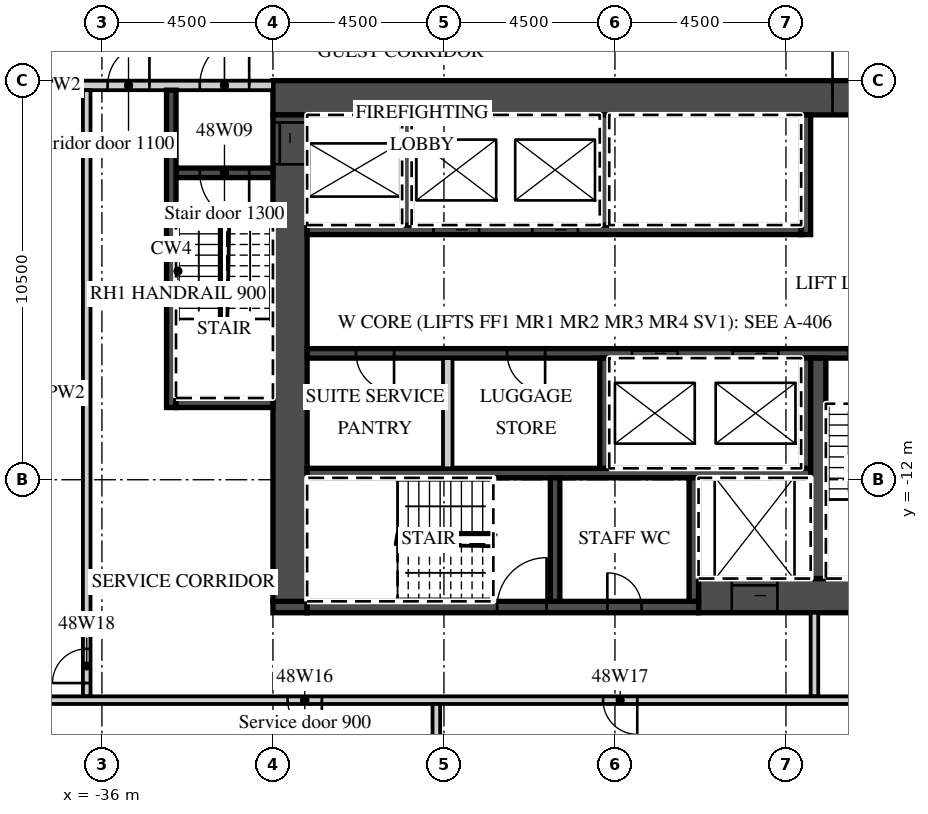
"""IFC4 building model, lengths in metres.
Left out: names, types, materials, properties, quantities, classifications, styles, units other than length and angle.
Written with IfcOpenShell. Run it as: python <this file> out.ifc"""

import sys

from ifc_helpers import new_model, si_unit, direction, frame, frame_2d, origin, place, context, subcontext, project, spatial, rectangle, extrude, element, fill, save


model = new_model("IFC4")
c1 = context("Model", 3, precision=1e-05, world=origin(), true_north=direction((0.0, 1.0)))
c2 = subcontext(c1, "Body", "Model", "MODEL_VIEW")
j1 = project(units=[si_unit("LENGTHUNIT", "METRE"), si_unit("PLANEANGLEUNIT", "RADIAN")], contexts=[c1])
p1 = place(None, origin())
s1 = spatial("IfcSite", under=j1, at=p1, CompositionType="ELEMENT")
p2 = place(p1, origin())
s2 = spatial("IfcBuilding", under=s1, at=p2, CompositionType="ELEMENT")
p3 = place(p2, frame((0.0, 0.0, 199.9)))
s3 = spatial("IfcBuildingStorey", under=s2, at=p3, CompositionType="ELEMENT", Elevation=199.9)
p4 = place(p3, frame((-31.5, -1.95, 0.0), z_axis=(0.0, 0.0, 1.0), x_axis=(1.0, 0.0, 0.0)))
e1 = element("IfcWall", 1, at=p4, inside=s3, PredefinedType="SHEAR", context=c2, shape_type="SweptSolid", body=[
    extrude(rectangle(XDim=18.0, YDim=0.9, at=frame_2d((9.0, 0.0))), origin(), (0.0, 0.0, 1.0), 3.02),
])
p5 = place(p4, frame((14.725, 0.0, 0.0)))
e2 = element("IfcOpeningElement", 2, at=p5, cuts=e1, PredefinedType="OPENING", context=c2, shape_type="SweptSolid", body=[
    extrude(rectangle(XDim=1.8, YDim=2.1, at=frame_2d((0.9, 1.05))), frame((0.0, 0.46, 0.0), z_axis=(0.0, -1.0, 0.0), x_axis=(1.0, 0.0, 0.0)), (0.0, 0.0, 1.0), 0.92),
])
p6 = place(p3, frame((-20.3, -15.05, 0.0), z_axis=(0.0, 0.0, 1.0), x_axis=(1.0, 0.0, 0.0)))
e3 = element("IfcWall", 3, at=p6, inside=s3, PredefinedType="SHEAR", context=c2, shape_type="SweptSolid", body=[
    extrude(rectangle(XDim=6.8, YDim=0.9, at=frame_2d((3.4, 0.0))), origin(), (0.0, 0.0, 1.0), 3.02),
])
p7 = place(p6, frame((0.875, 0.0, 0.0)))
e4 = element("IfcOpeningElement", 4, at=p7, cuts=e3, PredefinedType="OPENING", context=c2, shape_type="SweptSolid", body=[
    extrude(rectangle(XDim=1.2, YDim=2.1, at=frame_2d((0.6, 1.05))), frame((0.0, 0.46, 0.0), z_axis=(0.0, -1.0, 0.0), x_axis=(1.0, 0.0, 0.0)), (0.0, 0.0, 1.0), 0.92),
])
p8 = place(p3, frame((-31.5, -15.35, 0.0), z_axis=(0.0, 0.0, 1.0), x_axis=(1.0, 0.0, 0.0)))
e5 = element("IfcWall", 5, at=p8, inside=s3, PredefinedType="SHEAR", context=c2, shape_type="SweptSolid", body=[
    extrude(rectangle(XDim=0.9, YDim=0.3, at=frame_2d((0.45, 0.0))), origin(), (0.0, 0.0, 1.0), 3.02),
])
p9 = place(p3, frame((-30.6, -15.35, 0.0), z_axis=(0.0, 0.0, 1.0), x_axis=(1.0, 0.0, 0.0)))
e6 = element("IfcWall", 6, at=p9, inside=s3, PredefinedType="SHEAR", context=c2, shape_type="SweptSolid", body=[
    extrude(rectangle(XDim=10.3, YDim=0.3, at=frame_2d((5.15, 0.0))), origin(), (0.0, 0.0, 1.0), 3.02),
])
p10 = place(p9, frame((5.0, 0.0, 0.0)))
e7 = element("IfcOpeningElement", 7, at=p10, cuts=e6, PredefinedType="OPENING", context=c2, shape_type="SweptSolid", body=[
    extrude(rectangle(XDim=1.3, YDim=2.1, at=frame_2d((0.65, 1.05))), frame((0.0, 0.16, 0.0), z_axis=(0.0, -1.0, 0.0), x_axis=(1.0, 0.0, 0.0)), (0.0, 0.0, 1.0), 0.32),
])
p11 = place(p9, frame((7.9, 0.0, 0.0)))
e8 = element("IfcOpeningElement", 8, at=p11, cuts=e6, PredefinedType="OPENING", context=c2, shape_type="SweptSolid", body=[
    extrude(rectangle(XDim=0.9, YDim=2.1, at=frame_2d((0.45, 1.05))), frame((0.0, 0.16, 0.0), z_axis=(0.0, -1.0, 0.0), x_axis=(1.0, 0.0, 0.0)), (0.0, 0.0, 1.0), 0.32),
])
p12 = place(p3, frame((-31.05, -15.2, 0.0), z_axis=(0.0, 0.0, 1.0), x_axis=(0.0, 1.0, 0.0)))
e9 = element("IfcWall", 9, at=p12, inside=s3, PredefinedType="SHEAR", context=c2, shape_type="SweptSolid", body=[
    extrude(rectangle(XDim=12.8, YDim=0.9, at=frame_2d((6.4, 0.0))), origin(), (0.0, 0.0, 1.0), 3.02),
])
p13 = place(p12, frame((11.5, 0.0, 0.0)))
e10 = element("IfcOpeningElement", 10, at=p13, cuts=e9, PredefinedType="OPENING", context=c2, shape_type="SweptSolid", body=[
    extrude(rectangle(XDim=1.1, YDim=2.1, at=frame_2d((0.55, 1.05))), frame((0.0, 0.46, 0.0), z_axis=(0.0, -1.0, 0.0), x_axis=(1.0, 0.0, 0.0)), (0.0, 0.0, 1.0), 0.92),
])
p14 = place(p3, frame((-30.6, -5.425, 0.0), z_axis=(0.0, 0.0, 1.0), x_axis=(1.0, 0.0, 0.0)))
e11 = element("IfcWall", 11, at=p14, inside=s3, PredefinedType="SHEAR", context=c2, shape_type="SweptSolid", body=[
    extrude(rectangle(XDim=13.0, YDim=0.25, at=frame_2d((6.5, 0.0))), origin(), (0.0, 0.0, 1.0), 3.02),
])
p15 = place(p14, frame((3.325, 0.0, 0.0)))
e12 = element("IfcOpeningElement", 12, at=p15, cuts=e11, PredefinedType="OPENING", context=c2, shape_type="SweptSolid", body=[
    extrude(rectangle(XDim=1.2, YDim=2.1, at=frame_2d((0.6, 1.05))), frame((0.0, 0.135, 0.0), z_axis=(0.0, -1.0, 0.0), x_axis=(1.0, 0.0, 0.0)), (0.0, 0.0, 1.0), 0.27),
])
p16 = place(p14, frame((5.925, 0.0, 0.0)))
e13 = element("IfcOpeningElement", 13, at=p16, cuts=e11, PredefinedType="OPENING", context=c2, shape_type="SweptSolid", body=[
    extrude(rectangle(XDim=1.2, YDim=2.1, at=frame_2d((0.6, 1.05))), frame((0.0, 0.135, 0.0), z_axis=(0.0, -1.0, 0.0), x_axis=(1.0, 0.0, 0.0)), (0.0, 0.0, 1.0), 0.27),
])
p17 = place(p3, frame((-17.475, -5.55, 0.0), z_axis=(0.0, 0.0, 1.0), x_axis=(0.0, 1.0, 0.0)))
e14 = element("IfcWall", 14, at=p17, inside=s3, PredefinedType="SHEAR", context=c2, shape_type="SweptSolid", body=[
    extrude(rectangle(XDim=3.15, YDim=0.25, at=frame_2d((1.575, 0.0))), origin(), (0.0, 0.0, 1.0), 3.02),
])
for number, where, z_axis, x_axis in (
    (15, (-27.975, -5.3, 0.0), (0.0, 0.0, 1.0), (0.0, 1.0, 0.0)),
    (16, (-22.775, -5.3, 0.0), (0.0, 0.0, 1.0), (0.0, 1.0, 0.0)),
):
    element("IfcWall", number, at=place(p3, frame(where, z_axis=z_axis, x_axis=x_axis)), inside=s3, PredefinedType="SHEAR", context=c2, shape_type="SweptSolid", body=[
        extrude(rectangle(XDim=2.9, YDim=0.25, at=frame_2d((1.45, 0.0))), origin(), (0.0, 0.0, 1.0), 3.02),
    ])
p18 = place(p3, frame((-30.6, -8.675, 0.0), z_axis=(0.0, 0.0, 1.0), x_axis=(1.0, 0.0, 0.0)))
e17 = element("IfcWall", 17, at=p18, inside=s3, PredefinedType="SHEAR", context=c2, shape_type="SweptSolid", body=[
    extrude(rectangle(XDim=16.2, YDim=0.25, at=frame_2d((8.1, 0.0))), origin(), (0.0, 0.0, 1.0), 3.02),
])
p19 = place(p18, frame((8.55, 0.0, 0.0)))
e18 = element("IfcOpeningElement", 18, at=p19, cuts=e17, PredefinedType="OPENING", context=c2, shape_type="SweptSolid", body=[
    extrude(rectangle(XDim=1.2, YDim=2.1, at=frame_2d((0.6, 1.05))), frame((0.0, 0.135, 0.0), z_axis=(0.0, -1.0, 0.0), x_axis=(1.0, 0.0, 0.0)), (0.0, 0.0, 1.0), 0.27),
])
p20 = place(p18, frame((11.2, 0.0, 0.0)))
e19 = element("IfcOpeningElement", 19, at=p20, cuts=e17, PredefinedType="OPENING", context=c2, shape_type="SweptSolid", body=[
    extrude(rectangle(XDim=1.2, YDim=2.1, at=frame_2d((0.6, 1.05))), frame((0.0, 0.135, 0.0), z_axis=(0.0, -1.0, 0.0), x_axis=(1.0, 0.0, 0.0)), (0.0, 0.0, 1.0), 0.27),
])
p21 = place(p18, frame((14.25, 0.0, 0.0)))
e20 = element("IfcOpeningElement", 20, at=p21, cuts=e17, PredefinedType="OPENING", context=c2, shape_type="SweptSolid", body=[
    extrude(rectangle(XDim=1.3, YDim=2.1, at=frame_2d((0.65, 1.05))), frame((0.0, 0.135, 0.0), z_axis=(0.0, -1.0, 0.0), x_axis=(1.0, 0.0, 0.0)), (0.0, 0.0, 1.0), 0.27),
])
p22 = place(p18, frame((1.288, 0.0, 0.0)))
e21 = element("IfcOpeningElement", 21, at=p22, cuts=e17, PredefinedType="OPENING", context=c2, shape_type="SweptSolid", body=[
    extrude(rectangle(XDim=1.0, YDim=2.1, at=frame_2d((0.5, 1.05))), frame((0.0, 0.135, 0.0), z_axis=(0.0, -1.0, 0.0), x_axis=(1.0, 0.0, 0.0)), (0.0, 0.0, 1.0), 0.27),
])
p23 = place(p18, frame((5.262, 0.0, 0.0)))
e22 = element("IfcOpeningElement", 22, at=p23, cuts=e17, PredefinedType="OPENING", context=c2, shape_type="SweptSolid", body=[
    extrude(rectangle(XDim=1.0, YDim=2.1, at=frame_2d((0.5, 1.05))), frame((0.0, 0.135, 0.0), z_axis=(0.0, -1.0, 0.0), x_axis=(1.0, 0.0, 0.0)), (0.0, 0.0, 1.0), 0.27),
])
p24 = place(p3, frame((-30.6, -11.825, 0.0), z_axis=(0.0, 0.0, 1.0), x_axis=(1.0, 0.0, 0.0)))
e23 = element("IfcWall", 23, at=p24, inside=s3, PredefinedType="SHEAR", context=c2, shape_type="SweptSolid", body=[
    extrude(rectangle(XDim=13.25, YDim=0.25, at=frame_2d((6.625, 0.0))), origin(), (0.0, 0.0, 1.0), 3.02),
])
for number, where, z_axis, x_axis in (
    (24, (-17.475, -11.7, 0.0), (0.0, 0.0, 1.0), (0.0, 1.0, 0.0)),
    (25, (-22.775, -11.7, 0.0), (0.0, 0.0, 1.0), (0.0, 1.0, 0.0)),
):
    element("IfcWall", number, at=place(p3, frame(where, z_axis=z_axis, x_axis=x_axis)), inside=s3, PredefinedType="SHEAR", context=c2, shape_type="SweptSolid", body=[
        extrude(rectangle(XDim=2.9, YDim=0.25, at=frame_2d((1.45, 0.0))), origin(), (0.0, 0.0, 1.0), 3.02),
    ])
p25 = place(p3, frame((-26.9, -11.7, 0.0), z_axis=(0.0, 0.0, 1.0), x_axis=(0.0, 1.0, 0.0)))
e26 = element("IfcWall", 26, at=p25, inside=s3, PredefinedType="PARTITIONING", context=c2, shape_type="SweptSolid", body=[
    extrude(rectangle(XDim=2.9, YDim=0.25, at=frame_2d((1.45, 0.0))), origin(), (0.0, 0.0, 1.0), 3.02),
])
p26 = place(p3, frame((-17.15, -14.6, 0.0), z_axis=(0.0, 0.0, 1.0), x_axis=(0.0, 1.0, 0.0)))
e27 = element("IfcWall", 27, at=p26, inside=s3, PredefinedType="SHEAR", context=c2, shape_type="SweptSolid", body=[
    extrude(rectangle(XDim=5.8, YDim=0.4, at=frame_2d((2.9, 0.0))), origin(), (0.0, 0.0, 1.0), 3.02),
])
for number, where, z_axis, x_axis in (
    (28, (-20.425, -15.2, 0.0), (0.0, 0.0, 1.0), (0.0, 1.0, 0.0)),
    (29, (-24.075, -15.2, 0.0), (0.0, 0.0, 1.0), (0.0, 1.0, 0.0)),
):
    element("IfcWall", number, at=place(p3, frame(where, z_axis=z_axis, x_axis=x_axis)), inside=s3, PredefinedType="SHEAR", context=c2, shape_type="SweptSolid", body=[
        extrude(rectangle(XDim=3.25, YDim=0.25, at=frame_2d((1.625, 0.0))), origin(), (0.0, 0.0, 1.0), 3.02),
    ])
p27 = place(p3, frame((-42.632, -1.625, 0.0), z_axis=(0.0, 0.0, 1.0), x_axis=(1.0, 0.0, 0.0)))
e30 = element("IfcWall", 30, at=p27, inside=s3, PredefinedType="PARTITIONING", context=c2, shape_type="SweptSolid", body=[
    extrude(rectangle(XDim=11.132, YDim=0.25, at=frame_2d((5.566, 0.0))), origin(), (0.0, 0.0, 1.0), 3.02),
])
p28 = place(p27, frame((9.207, 0.0, 0.0)))
e31 = element("IfcOpeningElement", 31, at=p28, cuts=e30, PredefinedType="OPENING", context=c2, shape_type="SweptSolid", body=[
    extrude(rectangle(XDim=1.3, YDim=2.1, at=frame_2d((0.65, 1.05))), frame((0.0, 0.135, 0.0), z_axis=(0.0, -1.0, 0.0), x_axis=(1.0, 0.0, 0.0)), (0.0, 0.0, 1.0), 0.27),
])
p29 = place(p27, frame((6.781, 0.0, 0.0)))
e32 = element("IfcOpeningElement", 32, at=p29, cuts=e30, PredefinedType="OPENING", context=c2, shape_type="SweptSolid", body=[
    extrude(rectangle(XDim=1.1, YDim=2.1, at=frame_2d((0.55, 1.05))), frame((0.0, 0.135, 0.0), z_axis=(0.0, -1.0, 0.0), x_axis=(1.0, 0.0, 0.0)), (0.0, 0.0, 1.0), 0.27),
])
p30 = place(p3, frame((-34.05, -3.925, 0.0), z_axis=(0.0, 0.0, 1.0), x_axis=(1.0, 0.0, 0.0)))
e33 = element("IfcWall", 33, at=p30, inside=s3, PredefinedType="SHEAR", context=c2, shape_type="SweptSolid", body=[
    extrude(rectangle(XDim=2.55, YDim=0.25, at=frame_2d((1.275, 0.0))), origin(), (0.0, 0.0, 1.0), 3.02),
])
p31 = place(p30, frame((0.625, 0.0, 0.0)))
e34 = element("IfcOpeningElement", 34, at=p31, cuts=e33, PredefinedType="OPENING", context=c2, shape_type="SweptSolid", body=[
    extrude(rectangle(XDim=1.3, YDim=2.1, at=frame_2d((0.65, 1.05))), frame((0.0, 0.135, 0.0), z_axis=(0.0, -1.0, 0.0), x_axis=(1.0, 0.0, 0.0)), (0.0, 0.0, 1.0), 0.27),
])
p32 = place(p3, frame((-34.175, -10.1, 0.0), z_axis=(0.0, 0.0, 1.0), x_axis=(0.0, 1.0, 0.0)))
e35 = element("IfcWall", 35, at=p32, inside=s3, PredefinedType="SHEAR", context=c2, shape_type="SweptSolid", body=[
    extrude(rectangle(XDim=8.35, YDim=0.25, at=frame_2d((4.175, 0.0))), origin(), (0.0, 0.0, 1.0), 3.02),
])
p33 = place(p3, frame((-34.05, -9.975, 0.0), z_axis=(0.0, 0.0, 1.0), x_axis=(1.0, 0.0, 0.0)))
e36 = element("IfcWall", 36, at=p33, inside=s3, PredefinedType="SHEAR", context=c2, shape_type="SweptSolid", body=[
    extrude(rectangle(XDim=2.55, YDim=0.25, at=frame_2d((1.275, 0.0))), origin(), (0.0, 0.0, 1.0), 3.02),
])
p34 = place(p3, frame((-17.25, -17.7, 0.0), z_axis=(0.0, 0.0, 1.0), x_axis=(0.0, 1.0, 0.0)))
e37 = element("IfcWall", 37, at=p34, inside=s3, PredefinedType="PARTITIONING", context=c2, shape_type="SweptSolid", body=[
    extrude(rectangle(XDim=2.2, YDim=0.2, at=frame_2d((1.1, 0.0))), origin(), (0.0, 0.0, 1.0), 3.02),
])
p35 = place(p3, frame((-36.4, -17.7, 0.0), z_axis=(0.0, 0.0, 1.0), x_axis=(0.0, 1.0, 0.0)))
e38 = element("IfcWall", 38, at=p35, inside=s3, PredefinedType="PARTITIONING", context=c2, shape_type="SweptSolid", body=[
    extrude(rectangle(XDim=15.95, YDim=0.2, at=frame_2d((7.975, 0.0))), origin(), (0.0, 0.0, 1.0), 3.02),
])
p36 = place(p35, frame((0.35, 0.0, 0.0)))
e39 = element("IfcOpeningElement", 39, at=p36, cuts=e38, PredefinedType="OPENING", context=c2, shape_type="SweptSolid", body=[
    extrude(rectangle(XDim=0.9, YDim=2.1, at=frame_2d((0.45, 1.05))), frame((0.0, 0.11, 0.0), z_axis=(0.0, -1.0, 0.0), x_axis=(1.0, 0.0, 0.0)), (0.0, 0.0, 1.0), 0.22),
])
p37 = place(p3, frame((-41.074, -17.8, 0.0), z_axis=(0.0, 0.0, 1.0), x_axis=(1.0, 0.0, 0.0)))
e40 = element("IfcWall", 40, at=p37, inside=s3, PredefinedType="PARTITIONING", context=c2, shape_type="SweptSolid", body=[
    extrude(rectangle(XDim=27.474, YDim=0.2, at=frame_2d((13.737, 0.0))), origin(), (0.0, 0.0, 1.0), 3.02),
])
p38 = place(p37, frame((9.962, 0.0, 0.0)))
e41 = element("IfcOpeningElement", 41, at=p38, cuts=e40, PredefinedType="OPENING", context=c2, shape_type="SweptSolid", body=[
    extrude(rectangle(XDim=0.9, YDim=2.1, at=frame_2d((0.45, 1.05))), frame((0.0, 0.11, 0.0), z_axis=(0.0, -1.0, 0.0), x_axis=(1.0, 0.0, 0.0)), (0.0, 0.0, 1.0), 0.22),
])
p39 = place(p37, frame((18.262, 0.0, 0.0)))
e42 = element("IfcOpeningElement", 42, at=p39, cuts=e40, PredefinedType="OPENING", context=c2, shape_type="SweptSolid", body=[
    extrude(rectangle(XDim=0.9, YDim=2.1, at=frame_2d((0.45, 1.05))), frame((0.0, 0.11, 0.0), z_axis=(0.0, -1.0, 0.0), x_axis=(1.0, 0.0, 0.0)), (0.0, 0.0, 1.0), 0.22),
])
p40 = place(p3, frame((-27.2, -23.621, 0.0), z_axis=(0.0, 0.0, 1.0), x_axis=(0.0, 1.0, 0.0)))
e43 = element("IfcWall", 43, at=p40, inside=s3, PredefinedType="PARTITIONING", context=c2, shape_type="SweptSolid", body=[
    extrude(rectangle(XDim=5.721, YDim=0.2, at=frame_2d((2.86, 0.0))), origin(), (0.0, 0.0, 1.0), 3.02),
])
p41 = place(p19, origin())
e44 = element("IfcDoor", 44, at=p41, inside=s3, OperationType="SLIDING_TO_LEFT", PredefinedType="DOOR", context=c2, shape_type="SweptSolid", body=[
    extrude(rectangle(XDim=1.2, YDim=2.1, at=frame_2d((0.6, 1.05))), frame((0.0, 0.025, 0.0), z_axis=(0.0, -1.0, 0.0), x_axis=(1.0, 0.0, 0.0)), (0.0, 0.0, 1.0), 0.05),
])
fill(e18, e44)
p42 = place(p20, origin())
e45 = element("IfcDoor", 45, at=p42, inside=s3, OperationType="SLIDING_TO_RIGHT", PredefinedType="DOOR", context=c2, shape_type="SweptSolid", body=[
    extrude(rectangle(XDim=1.2, YDim=2.1, at=frame_2d((0.6, 1.05))), frame((0.0, 0.025, 0.0), z_axis=(0.0, -1.0, 0.0), x_axis=(1.0, 0.0, 0.0)), (0.0, 0.0, 1.0), 0.05),
])
fill(e19, e45)
p43 = place(p15, origin())
e46 = element("IfcDoor", 46, at=p43, inside=s3, OperationType="SLIDING_TO_RIGHT", PredefinedType="DOOR", context=c2, shape_type="SweptSolid", body=[
    extrude(rectangle(XDim=1.2, YDim=2.1, at=frame_2d((0.6, 1.05))), frame((0.0, 0.025, 0.0), z_axis=(0.0, -1.0, 0.0), x_axis=(1.0, 0.0, 0.0)), (0.0, 0.0, 1.0), 0.05),
])
fill(e12, e46)
p44 = place(p16, origin())
e47 = element("IfcDoor", 47, at=p44, inside=s3, OperationType="SLIDING_TO_RIGHT", PredefinedType="DOOR", context=c2, shape_type="SweptSolid", body=[
    extrude(rectangle(XDim=1.2, YDim=2.1, at=frame_2d((0.6, 1.05))), frame((0.0, 0.025, 0.0), z_axis=(0.0, -1.0, 0.0), x_axis=(1.0, 0.0, 0.0)), (0.0, 0.0, 1.0), 0.05),
])
fill(e13, e47)
p45 = place(p7, origin())
e48 = element("IfcDoor", 48, at=p45, inside=s3, OperationType="SLIDING_TO_LEFT", PredefinedType="DOOR", context=c2, shape_type="SweptSolid", body=[
    extrude(rectangle(XDim=1.2, YDim=2.1, at=frame_2d((0.6, 1.05))), frame((0.0, 0.025, 0.0), z_axis=(0.0, -1.0, 0.0), x_axis=(1.0, 0.0, 0.0)), (0.0, 0.0, 1.0), 0.05),
])
fill(e4, e48)
p46 = place(p13, origin())
e49 = element("IfcDoor", 49, at=p46, inside=s3, OperationType="SLIDING_TO_RIGHT", PredefinedType="DOOR", context=c2, shape_type="SweptSolid", body=[
    extrude(rectangle(XDim=1.1, YDim=2.1, at=frame_2d((0.55, 1.05))), frame((0.0, 0.025, 0.0), z_axis=(0.0, -1.0, 0.0), x_axis=(1.0, 0.0, 0.0)), (0.0, 0.0, 1.0), 0.05),
])
fill(e10, e49)
p47 = place(p5, origin())
e50 = element("IfcDoor", 50, at=p47, inside=s3, OperationType="DOUBLE_DOOR_DOUBLE_SWING", PredefinedType="DOOR", context=c2, shape_type="SweptSolid", body=[
    extrude(rectangle(XDim=1.8, YDim=2.1, at=frame_2d((0.9, 1.05))), frame((0.0, 0.025, 0.0), z_axis=(0.0, -1.0, 0.0), x_axis=(1.0, 0.0, 0.0)), (0.0, 0.0, 1.0), 0.05),
])
fill(e2, e50)
p48 = place(p28, origin())
e51 = element("IfcDoor", 51, at=p48, inside=s3, OperationType="SINGLE_SWING_RIGHT", PredefinedType="DOOR", context=c2, shape_type="SweptSolid", body=[
    extrude(rectangle(XDim=1.3, YDim=2.1, at=frame_2d((0.65, 1.05))), frame((0.0, 0.025, 0.0), z_axis=(0.0, -1.0, 0.0), x_axis=(1.0, 0.0, 0.0)), (0.0, 0.0, 1.0), 0.05),
])
fill(e31, e51)
p49 = place(p31, origin())
e52 = element("IfcDoor", 52, at=p49, inside=s3, OperationType="SINGLE_SWING_RIGHT", PredefinedType="DOOR", context=c2, shape_type="SweptSolid", body=[
    extrude(rectangle(XDim=1.3, YDim=2.1, at=frame_2d((0.65, 1.05))), frame((0.0, 0.025, 0.0), z_axis=(0.0, -1.0, 0.0), x_axis=(1.0, 0.0, 0.0)), (0.0, 0.0, 1.0), 0.05),
])
fill(e34, e52)
p50 = place(p29, origin())
e53 = element("IfcDoor", 53, at=p50, inside=s3, OperationType="SINGLE_SWING_RIGHT", PredefinedType="DOOR", context=c2, shape_type="SweptSolid", body=[
    extrude(rectangle(XDim=1.1, YDim=2.1, at=frame_2d((0.55, 1.05))), frame((0.0, 0.025, 0.0), z_axis=(0.0, -1.0, 0.0), x_axis=(1.0, 0.0, 0.0)), (0.0, 0.0, 1.0), 0.05),
])
fill(e32, e53)
p51 = place(p21, origin())
e54 = element("IfcDoor", 54, at=p51, inside=s3, OperationType="SINGLE_SWING_RIGHT", PredefinedType="DOOR", context=c2, shape_type="SweptSolid", body=[
    extrude(rectangle(XDim=1.3, YDim=2.1, at=frame_2d((0.65, 1.05))), frame((0.0, 0.025, 0.0), z_axis=(0.0, -1.0, 0.0), x_axis=(1.0, 0.0, 0.0)), (0.0, 0.0, 1.0), 0.05),
])
fill(e20, e54)
p52 = place(p10, origin())
e55 = element("IfcDoor", 55, at=p52, inside=s3, OperationType="SINGLE_SWING_RIGHT", PredefinedType="DOOR", context=c2, shape_type="SweptSolid", body=[
    extrude(rectangle(XDim=1.3, YDim=2.1, at=frame_2d((0.65, 1.05))), frame((0.0, 0.025, 0.0), z_axis=(0.0, -1.0, 0.0), x_axis=(1.0, 0.0, 0.0)), (0.0, 0.0, 1.0), 0.05),
])
fill(e7, e55)
p53 = place(p11, origin())
e56 = element("IfcDoor", 56, at=p53, inside=s3, OperationType="SINGLE_SWING_LEFT", PredefinedType="DOOR", context=c2, shape_type="SweptSolid", body=[
    extrude(rectangle(XDim=0.9, YDim=2.1, at=frame_2d((0.45, 1.05))), frame((0.0, 0.025, 0.0), z_axis=(0.0, -1.0, 0.0), x_axis=(1.0, 0.0, 0.0)), (0.0, 0.0, 1.0), 0.05),
])
fill(e8, e56)
p54 = place(p22, origin())
e57 = element("IfcDoor", 57, at=p54, inside=s3, OperationType="SINGLE_SWING_RIGHT", PredefinedType="DOOR", context=c2, shape_type="SweptSolid", body=[
    extrude(rectangle(XDim=1.0, YDim=2.1, at=frame_2d((0.5, 1.05))), frame((0.0, 0.025, 0.0), z_axis=(0.0, -1.0, 0.0), x_axis=(1.0, 0.0, 0.0)), (0.0, 0.0, 1.0), 0.05),
])
fill(e21, e57)
p55 = place(p23, origin())
e58 = element("IfcDoor", 58, at=p55, inside=s3, OperationType="SINGLE_SWING_RIGHT", PredefinedType="DOOR", context=c2, shape_type="SweptSolid", body=[
    extrude(rectangle(XDim=1.0, YDim=2.1, at=frame_2d((0.5, 1.05))), frame((0.0, 0.025, 0.0), z_axis=(0.0, -1.0, 0.0), x_axis=(1.0, 0.0, 0.0)), (0.0, 0.0, 1.0), 0.05),
])
fill(e22, e58)
p56 = place(p38, origin())
e59 = element("IfcDoor", 59, at=p56, inside=s3, OperationType="SINGLE_SWING_RIGHT", PredefinedType="DOOR", context=c2, shape_type="SweptSolid", body=[
    extrude(rectangle(XDim=0.9, YDim=2.1, at=frame_2d((0.45, 1.05))), frame((0.0, 0.025, 0.0), z_axis=(0.0, -1.0, 0.0), x_axis=(1.0, 0.0, 0.0)), (0.0, 0.0, 1.0), 0.05),
])
fill(e41, e59)
p57 = place(p39, origin())
e60 = element("IfcDoor", 60, at=p57, inside=s3, OperationType="SINGLE_SWING_RIGHT", PredefinedType="DOOR", context=c2, shape_type="SweptSolid", body=[
    extrude(rectangle(XDim=0.9, YDim=2.1, at=frame_2d((0.45, 1.05))), frame((0.0, 0.025, 0.0), z_axis=(0.0, -1.0, 0.0), x_axis=(1.0, 0.0, 0.0)), (0.0, 0.0, 1.0), 0.05),
])
fill(e42, e60)
p58 = place(p36, origin())
e61 = element("IfcDoor", 61, at=p58, inside=s3, OperationType="SINGLE_SWING_LEFT", PredefinedType="DOOR", context=c2, shape_type="SweptSolid", body=[
    extrude(rectangle(XDim=0.9, YDim=2.1, at=frame_2d((0.45, 1.05))), frame((0.0, 0.025, 0.0), z_axis=(0.0, -1.0, 0.0), x_axis=(1.0, 0.0, 0.0)), (0.0, 0.0, 1.0), 0.05),
])
fill(e39, e61)
save(model, sys.argv[1])
